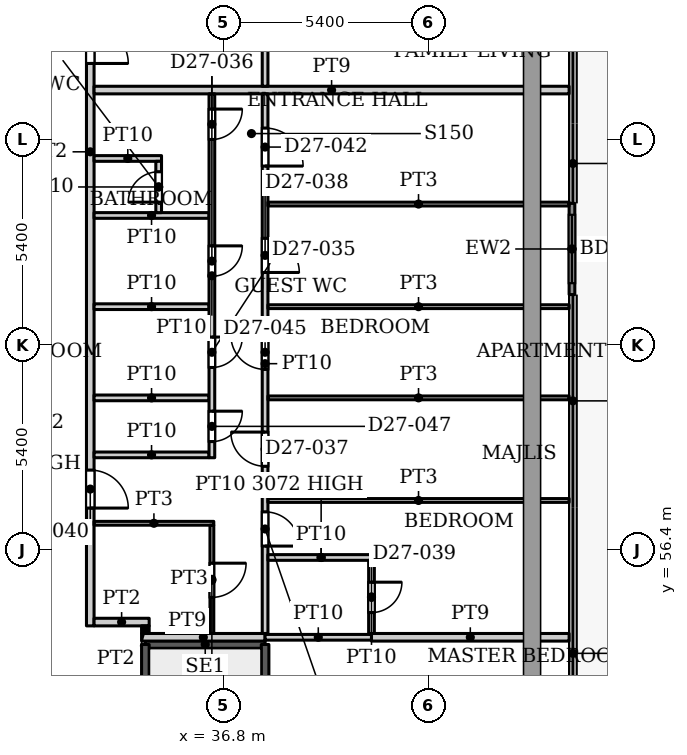
"""IFC4 building model, lengths in metres.
Left out: names, types, materials, properties, quantities, classifications, styles, units other than length and angle.
Written with IfcOpenShell. Run it as: python <this file> out.ifc"""

import sys

from ifc_helpers import new_model, si_unit, direction, frame, frame_2d, origin, place, context, subcontext, project, spatial, rectangle, extrude, source, transform, mapped, element, fill, save


model = new_model("IFC4")
c1 = context("Model", 3, precision=1e-05, world=origin(), true_north=direction((0.0, 1.0)))
c2 = subcontext(c1, "Body", "Model", "MODEL_VIEW")
j1 = project(units=[si_unit("LENGTHUNIT", "METRE"), si_unit("PLANEANGLEUNIT", "RADIAN")], contexts=[c1])
p1 = place(None, origin())
s1 = spatial("IfcSite", under=j1, at=p1, CompositionType="ELEMENT")
p2 = place(p1, origin())
s2 = spatial("IfcBuilding", under=s1, at=p2, CompositionType="ELEMENT")
p3 = place(p2, frame((0.0, 0.0, 117.5)))
s3 = spatial("IfcBuildingStorey", under=s2, at=p3, CompositionType="ELEMENT", Elevation=117.5)
p4 = place(p3, frame((45.975, 65.518, 0.0), z_axis=(0.0, 0.0, 1.0), x_axis=(0.0, -1.0, 0.0)))
e1 = element("IfcWall", 1, at=p4, inside=s3, PredefinedType="SOLIDWALL", context=c2, shape_type="SweptSolid", body=[
    extrude(rectangle(XDim=2.4, YDim=0.15, at=frame_2d((1.2, 0.0))), origin(), (0.0, 0.0, 1.0), 3.75),
])
p5 = place(p4, frame((0.3, 0.0, 0.0)))
e2 = element("IfcOpeningElement", 2, at=p5, cuts=e1, PredefinedType="OPENING", context=c2, shape_type="SweptSolid", body=[
    extrude(rectangle(XDim=1.8, YDim=2.4, at=frame_2d((0.9, 1.2))), frame((0.0, 0.085, 0.0), z_axis=(0.0, -1.0, 0.0), x_axis=(1.0, 0.0, 0.0)), (0.0, 0.0, 1.0), 0.17),
])
p6 = place(p3, frame((34.75, 53.91, 0.0), z_axis=(0.0, 0.0, 1.0), x_axis=(1.0, 0.0, 0.0)))
e3 = element("IfcWall", 3, at=p6, inside=s3, PredefinedType="SHEAR", context=c2, shape_type="SweptSolid", body=[
    extrude(rectangle(XDim=3.15, YDim=0.2, at=frame_2d((1.575, 0.0))), origin(), (0.0, 0.0, 1.0), 3.9),
])
p7 = place(p3, frame((34.75, 47.5, 0.0), z_axis=(0.0, 0.0, 1.0), x_axis=(0.0, 1.0, 0.0)))
e4 = element("IfcWall", 4, at=p7, inside=s3, PredefinedType="SHEAR", context=c2, shape_type="SweptSolid", body=[
    extrude(rectangle(XDim=6.41, YDim=0.2, at=frame_2d((3.205, 0.0))), origin(), (0.0, 0.0, 1.0), 3.9),
])
p8 = place(p3, frame((37.9, 44.75, 0.0), z_axis=(0.0, 0.0, 1.0), x_axis=(0.0, 1.0, 0.0)))
e5 = element("IfcWall", 5, at=p8, inside=s3, PredefinedType="SHEAR", context=c2, shape_type="SweptSolid", body=[
    extrude(rectangle(XDim=9.16, YDim=0.2, at=frame_2d((4.58, 0.0))), origin(), (0.0, 0.0, 1.0), 3.9),
])
p9 = place(p3, frame((33.3, 54.4, 0.0), z_axis=(0.0, 0.0, 1.0), x_axis=(0.0, 1.0, 0.0)))
e6 = element("IfcWall", 6, at=p9, inside=s3, PredefinedType="PARTITIONING", context=c2, shape_type="SweptSolid", body=[
    extrude(rectangle(XDim=24.95, YDim=0.2, at=frame_2d((12.475, 0.0))), origin(), (0.0, 0.0, 1.0), 3.6),
])
p10 = place(p9, frame((3.1, 0.0, 0.0)))
e7 = element("IfcOpeningElement", 7, at=p10, cuts=e6, PredefinedType="OPENING", context=c2, shape_type="SweptSolid", body=[
    extrude(rectangle(XDim=1.0, YDim=2.1, at=frame_2d((0.5, 1.05))), frame((0.0, 0.11, 0.0), z_axis=(0.0, -1.0, 0.0), x_axis=(1.0, 0.0, 0.0)), (0.0, 0.0, 1.0), 0.22),
])
p11 = place(p9, frame((14.8, 0.0, 0.0)))
e8 = element("IfcOpeningElement", 8, at=p11, cuts=e6, PredefinedType="OPENING", context=c2, shape_type="SweptSolid", body=[
    extrude(rectangle(XDim=1.0, YDim=2.1, at=frame_2d((0.5, 1.05))), frame((0.0, 0.11, 0.0), z_axis=(0.0, -1.0, 0.0), x_axis=(1.0, 0.0, 0.0)), (0.0, 0.0, 1.0), 0.22),
])
p12 = place(p3, frame((33.4, 54.5, 0.0), z_axis=(0.0, 0.0, 1.0), x_axis=(1.0, 0.0, 0.0)))
e9 = element("IfcWall", 9, at=p12, inside=s3, PredefinedType="PARTITIONING", context=c2, shape_type="SweptSolid", body=[
    extrude(rectangle(XDim=1.45, YDim=0.2, at=frame_2d((0.725, 0.0))), origin(), (0.0, 0.0, 1.0), 3.6),
])
p13 = place(p3, frame((33.4, 57.1, 0.0), z_axis=(0.0, 0.0, 1.0), x_axis=(1.0, 0.0, 0.0)))
e10 = element("IfcWall", 10, at=p13, inside=s3, PredefinedType="PARTITIONING", context=c2, shape_type="SweptSolid", body=[
    extrude(rectangle(XDim=3.15, YDim=0.1, at=frame_2d((1.575, 0.0))), origin(), (0.0, 0.0, 1.0), 3.6),
])
for number, where, z_axis, x_axis in (
    (11, (33.4, 58.9, 0.0), (0.0, 0.0, 1.0), (1.0, 0.0, 0.0)),
    (12, (33.4, 60.4, 0.0), (0.0, 0.0, 1.0), (1.0, 0.0, 0.0)),
    (13, (33.4, 62.8, 0.0), (0.0, 0.0, 1.0), (1.0, 0.0, 0.0)),
    (14, (33.4, 65.2, 0.0), (0.0, 0.0, 1.0), (1.0, 0.0, 0.0)),
):
    element("IfcWall", number, at=place(p3, frame(where, z_axis=z_axis, x_axis=x_axis)), inside=s3, PredefinedType="PARTITIONING", context=c2, shape_type="SweptSolid", body=[
        extrude(rectangle(XDim=3.025, YDim=0.15, at=frame_2d((1.513, 0.0))), origin(), (0.0, 0.0, 1.0), 3.6),
    ])
p14 = place(p3, frame((33.4, 66.7, 0.0), z_axis=(0.0, 0.0, 1.0), x_axis=(1.0, 0.0, 0.0)))
e15 = element("IfcWall", 15, at=p14, inside=s3, PredefinedType="PARTITIONING", context=c2, shape_type="SweptSolid", body=[
    extrude(rectangle(XDim=1.775, YDim=0.15, at=frame_2d((0.888, 0.0))), origin(), (0.0, 0.0, 1.0), 3.6),
])
p15 = place(p3, frame((33.4, 68.5, 0.0), z_axis=(0.0, 0.0, 1.0), x_axis=(1.0, 0.0, 0.0)))
e16 = element("IfcWall", 16, at=p15, inside=s3, PredefinedType="PARTITIONING", context=c2, shape_type="SweptSolid", body=[
    extrude(rectangle(XDim=12.5, YDim=0.2, at=frame_2d((6.25, 0.0))), origin(), (0.0, 0.0, 1.0), 3.6),
])
p16 = place(p3, frame((34.65, 54.1, 0.0), z_axis=(0.0, 0.0, 1.0), x_axis=(1.0, 0.0, 0.0)))
e17 = element("IfcWall", 17, at=p16, inside=s3, PredefinedType="PARTITIONING", context=c2, shape_type="SweptSolid", body=[
    extrude(rectangle(XDim=3.25, YDim=0.2, at=frame_2d((1.625, 0.0))), origin(), (0.0, 0.0, 1.0), 3.6),
])
p17 = place(p3, frame((34.75, 54.2, 0.0), z_axis=(0.0, 0.0, 1.0), x_axis=(0.0, 1.0, 0.0)))
e18 = element("IfcWall", 18, at=p17, inside=s3, PredefinedType="PARTITIONING", context=c2, shape_type="SweptSolid", body=[
    extrude(rectangle(XDim=0.2, YDim=0.2, at=frame_2d((0.1, 0.0))), origin(), (0.0, 0.0, 1.0), 3.6),
])
p18 = place(p3, frame((35.1, 65.275, 0.0), z_axis=(0.0, 0.0, 1.0), x_axis=(0.0, 1.0, 0.0)))
e19 = element("IfcWall", 19, at=p18, inside=s3, PredefinedType="PARTITIONING", context=c2, shape_type="SweptSolid", body=[
    extrude(rectangle(XDim=1.35, YDim=0.15, at=frame_2d((0.675, 0.0))), origin(), (0.0, 0.0, 1.0), 3.6),
])
p19 = place(p18, frame((0.275, 0.0, 0.0)))
e20 = element("IfcOpeningElement", 20, at=p19, cuts=e19, PredefinedType="OPENING", context=c2, shape_type="SweptSolid", body=[
    extrude(rectangle(XDim=0.8, YDim=2.1, at=frame_2d((0.4, 1.05))), frame((0.0, 0.085, 0.0), z_axis=(0.0, -1.0, 0.0), x_axis=(1.0, 0.0, 0.0)), (0.0, 0.0, 1.0), 0.17),
])
p20 = place(p3, frame((36.5, 54.2, 0.0), z_axis=(0.0, 0.0, 1.0), x_axis=(0.0, 1.0, 0.0)))
e21 = element("IfcWall", 21, at=p20, inside=s3, PredefinedType="PARTITIONING", context=c2, shape_type="SweptSolid", body=[
    extrude(rectangle(XDim=2.85, YDim=0.1, at=frame_2d((1.425, 0.0))), origin(), (0.0, 0.0, 1.0), 3.6),
])
p21 = place(p20, frame((0.95, 0.0, 0.0)))
e22 = element("IfcOpeningElement", 22, at=p21, cuts=e21, PredefinedType="OPENING", context=c2, shape_type="SweptSolid", body=[
    extrude(rectangle(XDim=0.9, YDim=2.1, at=frame_2d((0.45, 1.05))), frame((0.0, 0.06, 0.0), z_axis=(0.0, -1.0, 0.0), x_axis=(1.0, 0.0, 0.0)), (0.0, 0.0, 1.0), 0.12),
])
p22 = place(p3, frame((36.5, 58.825, 0.0), z_axis=(0.0, 0.0, 1.0), x_axis=(0.0, 1.0, 0.0)))
e23 = element("IfcWall", 23, at=p22, inside=s3, PredefinedType="PARTITIONING", context=c2, shape_type="SweptSolid", body=[
    extrude(rectangle(XDim=9.575, YDim=0.15, at=frame_2d((4.788, 0.0))), origin(), (0.0, 0.0, 1.0), 3.6),
])
p23 = place(p22, frame((2.375, 0.0, 0.0)))
e24 = element("IfcOpeningElement", 24, at=p23, cuts=e23, PredefinedType="OPENING", context=c2, shape_type="SweptSolid", body=[
    extrude(rectangle(XDim=0.8, YDim=2.1, at=frame_2d((0.4, 1.05))), frame((0.0, 0.085, 0.0), z_axis=(0.0, -1.0, 0.0), x_axis=(1.0, 0.0, 0.0)), (0.0, 0.0, 1.0), 0.17),
])
p24 = place(p22, frame((4.775, 0.0, 0.0)))
e25 = element("IfcOpeningElement", 25, at=p24, cuts=e23, PredefinedType="OPENING", context=c2, shape_type="SweptSolid", body=[
    extrude(rectangle(XDim=0.8, YDim=2.1, at=frame_2d((0.4, 1.05))), frame((0.0, 0.085, 0.0), z_axis=(0.0, -1.0, 0.0), x_axis=(1.0, 0.0, 0.0)), (0.0, 0.0, 1.0), 0.17),
])
p25 = place(p22, frame((8.375, 0.0, 0.0)))
e26 = element("IfcOpeningElement", 26, at=p25, cuts=e23, PredefinedType="OPENING", context=c2, shape_type="SweptSolid", body=[
    extrude(rectangle(XDim=0.8, YDim=2.1, at=frame_2d((0.4, 1.05))), frame((0.0, 0.085, 0.0), z_axis=(0.0, -1.0, 0.0), x_axis=(1.0, 0.0, 0.0)), (0.0, 0.0, 1.0), 0.17),
])
p26 = place(p22, frame((0.425, 0.0, 0.0)))
e27 = element("IfcOpeningElement", 27, at=p26, cuts=e23, PredefinedType="OPENING", context=c2, shape_type="SweptSolid", body=[
    extrude(rectangle(XDim=0.8, YDim=2.1, at=frame_2d((0.4, 1.05))), frame((0.0, 0.085, 0.0), z_axis=(0.0, -1.0, 0.0), x_axis=(1.0, 0.0, 0.0)), (0.0, 0.0, 1.0), 0.17),
])
p27 = place(p3, frame((37.9, 54.1, 0.0), z_axis=(0.0, 0.0, 1.0), x_axis=(1.0, 0.0, 0.0)))
e28 = element("IfcWall", 28, at=p27, inside=s3, PredefinedType="PARTITIONING", context=c2, shape_type="SweptSolid", body=[
    extrude(rectangle(XDim=2.8, YDim=0.15, at=frame_2d((1.4, 0.0))), origin(), (0.0, 0.0, 1.0), 3.6),
])
p28 = place(p3, frame((37.9, 54.2, 0.0), z_axis=(0.0, 0.0, 1.0), x_axis=(0.0, 1.0, 0.0)))
e29 = element("IfcWall", 29, at=p28, inside=s3, PredefinedType="PARTITIONING", context=c2, shape_type="SweptSolid", body=[
    extrude(rectangle(XDim=14.2, YDim=0.15, at=frame_2d((7.1, 0.0))), origin(), (0.0, 0.0, 1.0), 3.6),
])
p29 = place(p28, frame((4.4, 0.0, 0.0)))
e30 = element("IfcOpeningElement", 30, at=p29, cuts=e29, PredefinedType="OPENING", context=c2, shape_type="SweptSolid", body=[
    extrude(rectangle(XDim=0.9, YDim=2.1, at=frame_2d((0.45, 1.05))), frame((0.0, 0.085, 0.0), z_axis=(0.0, -1.0, 0.0), x_axis=(1.0, 0.0, 0.0)), (0.0, 0.0, 1.0), 0.17),
])
p30 = place(p28, frame((9.5, 0.0, 0.0)))
e31 = element("IfcOpeningElement", 31, at=p30, cuts=e29, PredefinedType="OPENING", context=c2, shape_type="SweptSolid", body=[
    extrude(rectangle(XDim=0.9, YDim=2.1, at=frame_2d((0.45, 1.05))), frame((0.0, 0.085, 0.0), z_axis=(0.0, -1.0, 0.0), x_axis=(1.0, 0.0, 0.0)), (0.0, 0.0, 1.0), 0.17),
])
p31 = place(p28, frame((12.3, 0.0, 0.0)))
e32 = element("IfcOpeningElement", 32, at=p31, cuts=e29, PredefinedType="OPENING", context=c2, shape_type="SweptSolid", body=[
    extrude(rectangle(XDim=1.0, YDim=2.1, at=frame_2d((0.5, 1.05))), frame((0.0, 0.085, 0.0), z_axis=(0.0, -1.0, 0.0), x_axis=(1.0, 0.0, 0.0)), (0.0, 0.0, 1.0), 0.17),
])
p32 = place(p28, frame((6.95, 0.0, 0.0)))
e33 = element("IfcOpeningElement", 33, at=p32, cuts=e29, PredefinedType="OPENING", context=c2, shape_type="SweptSolid", body=[
    extrude(rectangle(XDim=0.9, YDim=2.1, at=frame_2d((0.45, 1.05))), frame((0.0, 0.085, 0.0), z_axis=(0.0, -1.0, 0.0), x_axis=(1.0, 0.0, 0.0)), (0.0, 0.0, 1.0), 0.17),
])
p33 = place(p28, frame((2.3, 0.0, 0.0)))
e34 = element("IfcOpeningElement", 34, at=p33, cuts=e29, PredefinedType="OPENING", context=c2, shape_type="SweptSolid", body=[
    extrude(rectangle(XDim=0.9, YDim=2.1, at=frame_2d((0.45, 1.05))), frame((0.0, 0.085, 0.0), z_axis=(0.0, -1.0, 0.0), x_axis=(1.0, 0.0, 0.0)), (0.0, 0.0, 1.0), 0.17),
])
p34 = place(p3, frame((37.9, 68.6, 0.0), z_axis=(0.0, 0.0, 1.0), x_axis=(0.0, 1.0, 0.0)))
e35 = element("IfcWall", 35, at=p34, inside=s3, PredefinedType="PARTITIONING", context=c2, shape_type="SweptSolid", body=[
    extrude(rectangle(XDim=10.65, YDim=0.15, at=frame_2d((5.325, 0.0))), origin(), (0.0, 0.0, 1.0), 3.6),
])
p35 = place(p34, frame((1.25, 0.0, 0.0)))
e36 = element("IfcOpeningElement", 36, at=p35, cuts=e35, PredefinedType="OPENING", context=c2, shape_type="SweptSolid", body=[
    extrude(rectangle(XDim=0.9, YDim=2.1, at=frame_2d((0.45, 1.05))), frame((0.0, 0.085, 0.0), z_axis=(0.0, -1.0, 0.0), x_axis=(1.0, 0.0, 0.0)), (0.0, 0.0, 1.0), 0.17),
])
p36 = place(p34, frame((8.4, 0.0, 0.0)))
e37 = element("IfcOpeningElement", 37, at=p36, cuts=e35, PredefinedType="OPENING", context=c2, shape_type="SweptSolid", body=[
    extrude(rectangle(XDim=1.0, YDim=2.1, at=frame_2d((0.5, 1.05))), frame((0.0, 0.085, 0.0), z_axis=(0.0, -1.0, 0.0), x_axis=(1.0, 0.0, 0.0)), (0.0, 0.0, 1.0), 0.17),
])
p37 = place(p34, frame((3.8, 0.0, 0.0)))
e38 = element("IfcOpeningElement", 38, at=p37, cuts=e35, PredefinedType="OPENING", context=c2, shape_type="SweptSolid", body=[
    extrude(rectangle(XDim=0.9, YDim=2.1, at=frame_2d((0.45, 1.05))), frame((0.0, 0.085, 0.0), z_axis=(0.0, -1.0, 0.0), x_axis=(1.0, 0.0, 0.0)), (0.0, 0.0, 1.0), 0.17),
])
p38 = place(p3, frame((37.975, 56.2, 0.0), z_axis=(0.0, 0.0, 1.0), x_axis=(1.0, 0.0, 0.0)))
e39 = element("IfcWall", 39, at=p38, inside=s3, PredefinedType="PARTITIONING", context=c2, shape_type="SweptSolid", body=[
    extrude(rectangle(XDim=2.8, YDim=0.15, at=frame_2d((1.4, 0.0))), origin(), (0.0, 0.0, 1.0), 3.072),
])
for number, where, z_axis, x_axis in (
    (40, (37.975, 57.7, 0.0), (0.0, 0.0, 1.0), (1.0, 0.0, 0.0)),
    (41, (37.975, 60.4, 0.0), (0.0, 0.0, 1.0), (1.0, 0.0, 0.0)),
    (42, (37.975, 62.8, 0.0), (0.0, 0.0, 1.0), (1.0, 0.0, 0.0)),
    (43, (37.975, 65.5, 0.0), (0.0, 0.0, 1.0), (1.0, 0.0, 0.0)),
):
    element("IfcWall", number, at=place(p3, frame(where, z_axis=z_axis, x_axis=x_axis)), inside=s3, PredefinedType="PARTITIONING", context=c2, shape_type="SweptSolid", body=[
        extrude(rectangle(XDim=7.925, YDim=0.1, at=frame_2d((3.962, 0.0))), origin(), (0.0, 0.0, 1.0), 3.6),
    ])
p39 = place(p3, frame((40.7, 54.1, 0.0), z_axis=(0.0, 0.0, 1.0), x_axis=(1.0, 0.0, 0.0)))
e44 = element("IfcWall", 44, at=p39, inside=s3, PredefinedType="PARTITIONING", context=c2, shape_type="SweptSolid", body=[
    extrude(rectangle(XDim=5.2, YDim=0.2, at=frame_2d((2.6, 0.0))), origin(), (0.0, 0.0, 1.0), 3.6),
])
p40 = place(p3, frame((40.7, 54.2, 0.0), z_axis=(0.0, 0.0, 1.0), x_axis=(0.0, 1.0, 0.0)))
e45 = element("IfcWall", 45, at=p40, inside=s3, PredefinedType="PARTITIONING", context=c2, shape_type="SweptSolid", body=[
    extrude(rectangle(XDim=1.925, YDim=0.15, at=frame_2d((0.962, 0.0))), origin(), (0.0, 0.0, 1.0), 3.6),
])
p41 = place(p40, frame((0.55, 0.0, 0.0)))
e46 = element("IfcOpeningElement", 46, at=p41, cuts=e45, PredefinedType="OPENING", context=c2, shape_type="SweptSolid", body=[
    extrude(rectangle(XDim=0.8, YDim=2.1, at=frame_2d((0.4, 1.05))), frame((0.0, 0.085, 0.0), z_axis=(0.0, -1.0, 0.0), x_axis=(1.0, 0.0, 0.0)), (0.0, 0.0, 1.0), 0.17),
])
m1 = source(origin(), c2, "Body", "SweptSolid", [
    extrude(rectangle(XDim=1.8, YDim=2.4, at=frame_2d((0.9, 1.2))), frame((0.0, 0.025, 0.0), z_axis=(0.0, -1.0, 0.0), x_axis=(1.0, 0.0, 0.0)), (0.0, 0.0, 1.0), 0.05),
])
p42 = place(p5, origin())
e47 = element("IfcDoor", 47, at=p42, inside=s3, OperationType="SLIDING_TO_LEFT", PredefinedType="DOOR", context=c2, shape_type="MappedRepresentation", body=[
    mapped(m1, transform((0.0, 0.0, 0.0), x_axis=(1.0, 0.0, 0.0), y_axis=(0.0, 1.0, 0.0), z_axis=(0.0, 0.0, 1.0), scale=1.0)),
])
fill(e2, e47)
m2 = source(origin(), c2, "Body", "SweptSolid", [
    extrude(rectangle(XDim=0.8, YDim=2.1, at=frame_2d((0.4, 1.05))), frame((0.0, 0.025, 0.0), z_axis=(0.0, -1.0, 0.0), x_axis=(1.0, 0.0, 0.0)), (0.0, 0.0, 1.0), 0.05),
])
p43 = place(p23, origin())
e48 = element("IfcDoor", 48, at=p43, inside=s3, OperationType="SINGLE_SWING_RIGHT", PredefinedType="DOOR", context=c2, shape_type="MappedRepresentation", body=[
    mapped(m2, transform((0.0, 0.0, 0.0), x_axis=(1.0, 0.0, 0.0), y_axis=(0.0, 1.0, 0.0), z_axis=(0.0, 0.0, 1.0), scale=1.0)),
])
fill(e24, e48)
p44 = place(p24, origin())
e49 = element("IfcDoor", 49, at=p44, inside=s3, OperationType="SINGLE_SWING_RIGHT", PredefinedType="DOOR", context=c2, shape_type="MappedRepresentation", body=[
    mapped(m2, transform((0.0, 0.0, 0.0), x_axis=(1.0, 0.0, 0.0), y_axis=(0.0, 1.0, 0.0), z_axis=(0.0, 0.0, 1.0), scale=1.0)),
])
fill(e25, e49)
m3 = source(origin(), c2, "Body", "SweptSolid", [
    extrude(rectangle(XDim=0.9, YDim=2.1, at=frame_2d((0.45, 1.05))), frame((0.0, 0.025, 0.0), z_axis=(0.0, -1.0, 0.0), x_axis=(1.0, 0.0, 0.0)), (0.0, 0.0, 1.0), 0.05),
])
p45 = place(p29, origin())
e50 = element("IfcDoor", 50, at=p45, inside=s3, OperationType="SINGLE_SWING_LEFT", PredefinedType="DOOR", context=c2, shape_type="MappedRepresentation", body=[
    mapped(m3, transform((0.0, 0.0, 0.0), x_axis=(1.0, 0.0, 0.0), y_axis=(0.0, 1.0, 0.0), z_axis=(0.0, 0.0, 1.0), scale=1.0)),
])
fill(e30, e50)
p46 = place(p30, origin())
e51 = element("IfcDoor", 51, at=p46, inside=s3, OperationType="SINGLE_SWING_RIGHT", PredefinedType="DOOR", context=c2, shape_type="MappedRepresentation", body=[
    mapped(m3, transform((0.0, 0.0, 0.0), x_axis=(1.0, 0.0, 0.0), y_axis=(0.0, 1.0, 0.0), z_axis=(0.0, 0.0, 1.0), scale=1.0)),
])
fill(e31, e51)
p47 = place(p41, origin())
e52 = element("IfcDoor", 52, at=p47, inside=s3, OperationType="SINGLE_SWING_RIGHT", PredefinedType="DOOR", context=c2, shape_type="MappedRepresentation", body=[
    mapped(m2, transform((0.0, 0.0, 0.0), x_axis=(1.0, 0.0, 0.0), y_axis=(0.0, 1.0, 0.0), z_axis=(0.0, 0.0, 1.0), scale=1.0)),
])
fill(e46, e52)
m4 = source(origin(), c2, "Body", "SweptSolid", [
    extrude(rectangle(XDim=1.0, YDim=2.1, at=frame_2d((0.5, 1.05))), frame((0.0, 0.025, 0.0), z_axis=(0.0, -1.0, 0.0), x_axis=(1.0, 0.0, 0.0)), (0.0, 0.0, 1.0), 0.05),
])
p48 = place(p10, origin())
e53 = element("IfcDoor", 53, at=p48, inside=s3, OperationType="SINGLE_SWING_RIGHT", PredefinedType="DOOR", context=c2, shape_type="MappedRepresentation", body=[
    mapped(m4, transform((0.0, 0.0, 0.0), x_axis=(1.0, 0.0, 0.0), y_axis=(0.0, 1.0, 0.0), z_axis=(0.0, 0.0, 1.0), scale=1.0)),
])
fill(e7, e53)
p49 = place(p21, origin())
e54 = element("IfcDoor", 54, at=p49, inside=s3, OperationType="SINGLE_SWING_RIGHT", PredefinedType="DOOR", context=c2, shape_type="MappedRepresentation", body=[
    mapped(m3, transform((0.0, 0.0, 0.0), x_axis=(1.0, 0.0, 0.0), y_axis=(0.0, 1.0, 0.0), z_axis=(0.0, 0.0, 1.0), scale=1.0)),
])
fill(e22, e54)
m5 = source(origin(), c2, "Body", "SweptSolid", [
    extrude(rectangle(XDim=1.0, YDim=2.1, at=frame_2d((0.5, 1.05))), frame((0.0, 0.025, 0.0), z_axis=(0.0, -1.0, 0.0), x_axis=(1.0, 0.0, 0.0)), (0.0, 0.0, 1.0), 0.05),
])
p50 = place(p31, origin())
e55 = element("IfcDoor", 55, at=p50, inside=s3, OperationType="SINGLE_SWING_RIGHT", PredefinedType="DOOR", context=c2, shape_type="MappedRepresentation", body=[
    mapped(m5, transform((0.0, 0.0, 0.0), x_axis=(1.0, 0.0, 0.0), y_axis=(0.0, 1.0, 0.0), z_axis=(0.0, 0.0, 1.0), scale=1.0)),
])
fill(e32, e55)
p51 = place(p25, origin())
e56 = element("IfcDoor", 56, at=p51, inside=s3, OperationType="SINGLE_SWING_RIGHT", PredefinedType="DOOR", context=c2, shape_type="MappedRepresentation", body=[
    mapped(m2, transform((0.0, 0.0, 0.0), x_axis=(1.0, 0.0, 0.0), y_axis=(0.0, 1.0, 0.0), z_axis=(0.0, 0.0, 1.0), scale=1.0)),
])
fill(e26, e56)
p52 = place(p19, origin())
e57 = element("IfcDoor", 57, at=p52, inside=s3, OperationType="SINGLE_SWING_LEFT", PredefinedType="DOOR", context=c2, shape_type="MappedRepresentation", body=[
    mapped(m2, transform((0.0, 0.0, 0.0), x_axis=(1.0, 0.0, 0.0), y_axis=(0.0, 1.0, 0.0), z_axis=(0.0, 0.0, 1.0), scale=1.0)),
])
fill(e20, e57)
p53 = place(p32, origin())
e58 = element("IfcDoor", 58, at=p53, inside=s3, OperationType="SINGLE_SWING_LEFT", PredefinedType="DOOR", context=c2, shape_type="MappedRepresentation", body=[
    mapped(m3, transform((0.0, 0.0, 0.0), x_axis=(1.0, 0.0, 0.0), y_axis=(0.0, 1.0, 0.0), z_axis=(0.0, 0.0, 1.0), scale=1.0)),
])
fill(e33, e58)
p54 = place(p33, origin())
e59 = element("IfcDoor", 59, at=p54, inside=s3, OperationType="SINGLE_SWING_RIGHT", PredefinedType="DOOR", context=c2, shape_type="MappedRepresentation", body=[
    mapped(m3, transform((0.0, 0.0, 0.0), x_axis=(1.0, 0.0, 0.0), y_axis=(0.0, 1.0, 0.0), z_axis=(0.0, 0.0, 1.0), scale=1.0)),
])
fill(e34, e59)
p55 = place(p26, origin())
e60 = element("IfcDoor", 60, at=p55, inside=s3, OperationType="SINGLE_SWING_RIGHT", PredefinedType="DOOR", context=c2, shape_type="MappedRepresentation", body=[
    mapped(m2, transform((0.0, 0.0, 0.0), x_axis=(1.0, 0.0, 0.0), y_axis=(0.0, 1.0, 0.0), z_axis=(0.0, 0.0, 1.0), scale=1.0)),
])
fill(e27, e60)
p56 = place(p11, origin())
e61 = element("IfcDoor", 61, at=p56, inside=s3, OperationType="SINGLE_SWING_RIGHT", PredefinedType="DOOR", context=c2, shape_type="MappedRepresentation", body=[
    mapped(m4, transform((0.0, 0.0, 0.0), x_axis=(1.0, 0.0, 0.0), y_axis=(0.0, 1.0, 0.0), z_axis=(0.0, 0.0, 1.0), scale=1.0)),
])
fill(e8, e61)
save(model, sys.argv[1])
